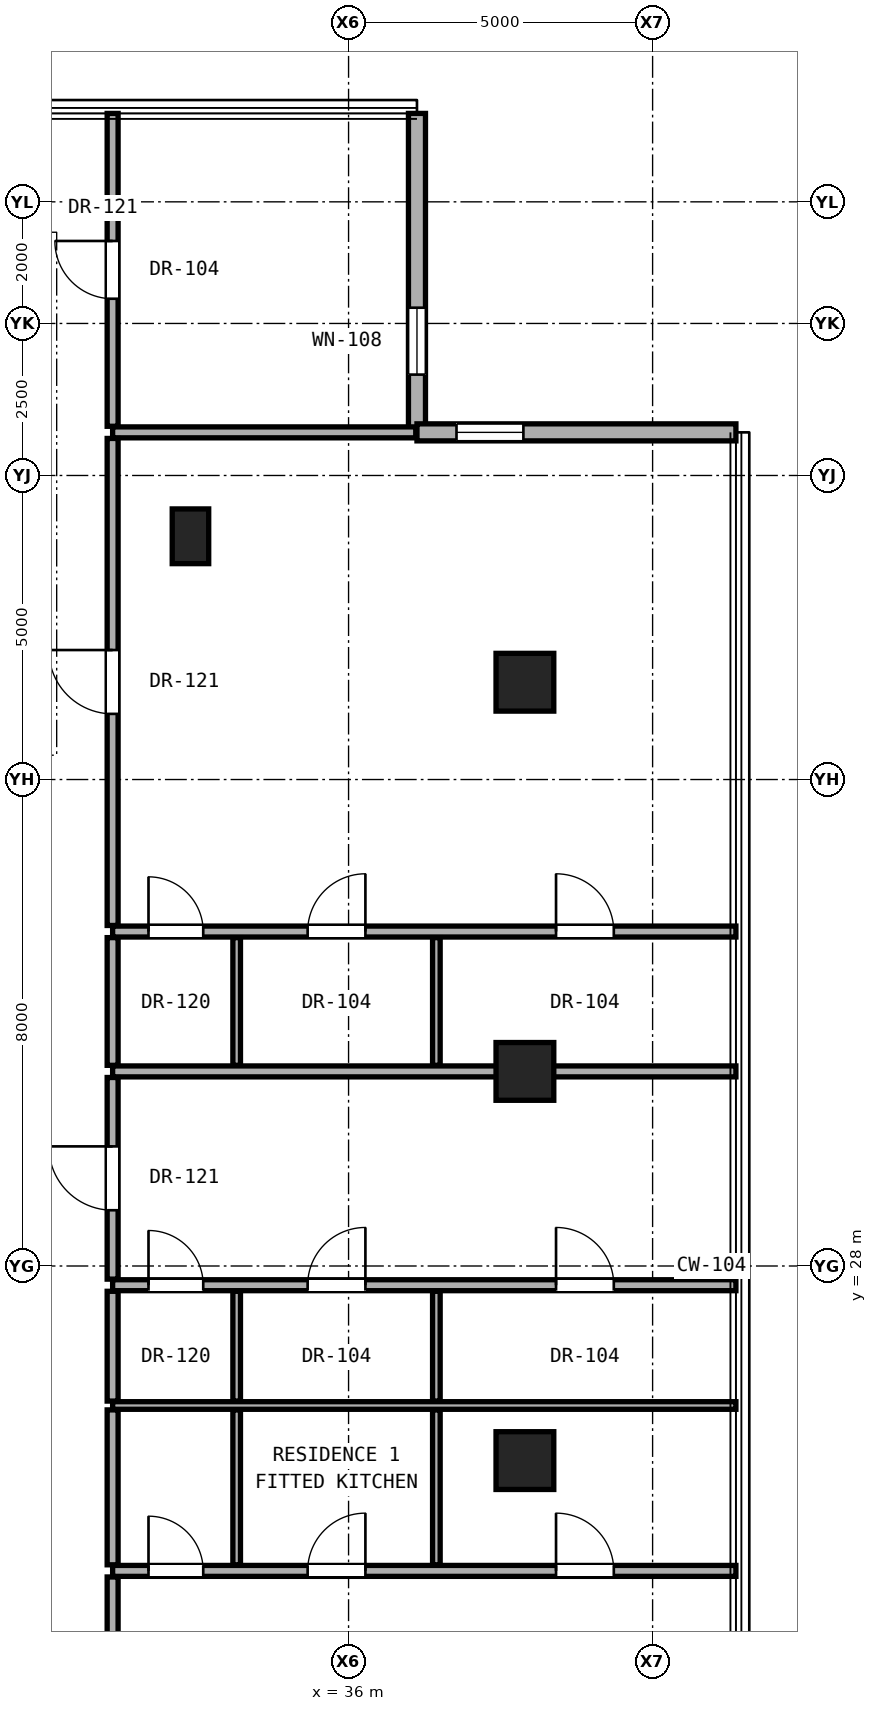
"""IFC4 building model, lengths in metres.
Left out: names, types, materials, properties, quantities, classifications, styles, units other than length and angle.
Written with IfcOpenShell. Run it as: python <this file> out.ifc"""

import sys

from ifc_helpers import new_model, si_unit, direction, frame, frame_2d, origin, origin_2d, place, context, subcontext, project, spatial, rectangle, hollow_rectangle, extrude, element, fill, save


model = new_model("IFC4")
c1 = context("Model", 3, precision=1e-05, world=origin(), true_north=direction((0.0, 1.0)))
c2 = subcontext(c1, "Body", "Model", "MODEL_VIEW")
j1 = project(units=[si_unit("LENGTHUNIT", "METRE"), si_unit("PLANEANGLEUNIT", "RADIAN")], contexts=[c1])
p1 = place(None, origin())
s1 = spatial("IfcSite", under=j1, at=p1, CompositionType="ELEMENT")
p2 = place(p1, origin())
s2 = spatial("IfcBuilding", under=s1, at=p2, CompositionType="ELEMENT")
p3 = place(p2, frame((0.0, 0.0, 180.4)))
s3 = spatial("IfcBuildingStorey", under=s2, at=p3, CompositionType="ELEMENT", Elevation=180.4)
for number, where, z_axis, x_axis in (
    (1, (38.9, 24.8, 0.0), (0.0, 0.0, 1.0), (1.0, 0.0, 0.0)),
    (2, (38.9, 31.2, 0.0), (0.0, 0.0, 1.0), (1.0, 0.0, 0.0)),
    (3, (38.9, 37.6, 0.0), (0.0, 0.0, 1.0), (1.0, 0.0, 0.0)),
):
    element("IfcColumn", number, at=place(p3, frame(where, z_axis=z_axis, x_axis=x_axis)), inside=s3, PredefinedType="COLUMN", context=c2, shape_type="SweptSolid", body=[
        extrude(hollow_rectangle(XDim=0.95, YDim=0.95, WallThickness=0.05, at=origin_2d()), origin(), (0.0, 0.0, 1.0), 3.25),
    ])
p4 = place(p3, frame((33.4, 40.0, 0.0), z_axis=(0.0, 0.0, 1.0), x_axis=(1.0, 0.0, 0.0)))
e4 = element("IfcColumn", 4, at=p4, inside=s3, PredefinedType="PILASTER", context=c2, shape_type="SweptSolid", body=[
    extrude(rectangle(XDim=0.6, YDim=0.9, at=origin_2d()), origin(), (0.0, 0.0, 1.0), 3.25),
])
p5 = place(p3, frame((37.125, 41.709, 0.0), z_axis=(0.0, 0.0, 1.0), x_axis=(0.0, 1.0, 0.0)))
e5 = element("IfcWall", 5, at=p5, inside=s3, PredefinedType="SOLIDWALL", context=c2, shape_type="SweptSolid", body=[
    extrude(rectangle(XDim=5.245, YDim=0.28, at=frame_2d((2.623, 0.0))), origin(), (0.0, 0.0, 1.0), 3.03),
])
p6 = place(p5, frame((0.95, 0.0, 0.85)))
e6 = element("IfcOpeningElement", 6, at=p6, cuts=e5, PredefinedType="OPENING", context=c2, shape_type="SweptSolid", body=[
    extrude(rectangle(XDim=1.1, YDim=2.0, at=frame_2d((0.55, 1.0))), frame((0.0, 0.15, 0.0), z_axis=(0.0, -1.0, 0.0), x_axis=(1.0, 0.0, 0.0)), (0.0, 0.0, 1.0), 0.3),
])
p7 = place(p3, frame((42.37, 41.709, 0.0), z_axis=(0.0, 0.0, 1.0), x_axis=(-1.0, 0.0, 0.0)))
e7 = element("IfcWall", 7, at=p7, inside=s3, PredefinedType="SOLIDWALL", context=c2, shape_type="SweptSolid", body=[
    extrude(rectangle(XDim=5.245, YDim=0.28, at=frame_2d((2.623, 0.0))), origin(), (0.0, 0.0, 1.0), 3.03),
])
p8 = place(p7, frame((3.495, 0.0, 0.85)))
e8 = element("IfcOpeningElement", 8, at=p8, cuts=e7, PredefinedType="OPENING", context=c2, shape_type="SweptSolid", body=[
    extrude(rectangle(XDim=1.1, YDim=2.0, at=frame_2d((0.55, 1.0))), frame((0.0, 0.15, 0.0), z_axis=(0.0, -1.0, 0.0), x_axis=(1.0, 0.0, 0.0)), (0.0, 0.0, 1.0), 0.3),
])
p9 = place(p3, frame((32.12, 22.986, 0.0), z_axis=(0.0, 0.0, 1.0), x_axis=(1.0, 0.0, 0.0)))
e9 = element("IfcWall", 9, at=p9, inside=s3, PredefinedType="PARTITIONING", context=c2, shape_type="SweptSolid", body=[
    extrude(rectangle(XDim=10.25, YDim=0.18, at=frame_2d((5.125, 0.0))), origin(), (0.0, 0.0, 1.0), 2.269),
])
p10 = place(p9, frame((7.292, 0.0, 0.0)))
e10 = element("IfcOpeningElement", 10, at=p10, cuts=e9, PredefinedType="OPENING", context=c2, shape_type="SweptSolid", body=[
    extrude(rectangle(XDim=0.95, YDim=2.15, at=frame_2d((0.475, 1.075))), frame((0.0, 0.1, 0.0), z_axis=(0.0, -1.0, 0.0), x_axis=(1.0, 0.0, 0.0)), (0.0, 0.0, 1.0), 0.2),
])
p11 = place(p9, frame((3.207, 0.0, 0.0)))
e11 = element("IfcOpeningElement", 11, at=p11, cuts=e9, PredefinedType="OPENING", context=c2, shape_type="SweptSolid", body=[
    extrude(rectangle(XDim=0.95, YDim=2.15, at=frame_2d((0.475, 1.075))), frame((0.0, 0.1, 0.0), z_axis=(0.0, -1.0, 0.0), x_axis=(1.0, 0.0, 0.0)), (0.0, 0.0, 1.0), 0.2),
])
p12 = place(p9, frame((0.59, 0.0, 0.0)))
e12 = element("IfcOpeningElement", 12, at=p12, cuts=e9, PredefinedType="OPENING", context=c2, shape_type="SweptSolid", body=[
    extrude(rectangle(XDim=0.9, YDim=2.1, at=frame_2d((0.45, 1.05))), frame((0.0, 0.1, 0.0), z_axis=(0.0, -1.0, 0.0), x_axis=(1.0, 0.0, 0.0)), (0.0, 0.0, 1.0), 0.2),
])
p13 = place(p3, frame((32.12, 25.706, 0.0), z_axis=(0.0, 0.0, 1.0), x_axis=(1.0, 0.0, 0.0)))
e13 = element("IfcWall", 13, at=p13, inside=s3, PredefinedType="PARTITIONING", context=c2, shape_type="SweptSolid", body=[
    extrude(rectangle(XDim=10.25, YDim=0.125, at=frame_2d((5.125, 0.0))), origin(), (0.0, 0.0, 1.0), 2.269),
])
p14 = place(p3, frame((32.12, 27.684, 0.0), z_axis=(0.0, 0.0, 1.0), x_axis=(1.0, 0.0, 0.0)))
e14 = element("IfcWall", 14, at=p14, inside=s3, PredefinedType="PARTITIONING", context=c2, shape_type="SweptSolid", body=[
    extrude(rectangle(XDim=10.25, YDim=0.18, at=frame_2d((5.125, 0.0))), origin(), (0.0, 0.0, 1.0), 2.269),
])
p15 = place(p14, frame((7.292, 0.0, 0.0)))
e15 = element("IfcOpeningElement", 15, at=p15, cuts=e14, PredefinedType="OPENING", context=c2, shape_type="SweptSolid", body=[
    extrude(rectangle(XDim=0.95, YDim=2.15, at=frame_2d((0.475, 1.075))), frame((0.0, 0.1, 0.0), z_axis=(0.0, -1.0, 0.0), x_axis=(1.0, 0.0, 0.0)), (0.0, 0.0, 1.0), 0.2),
])
p16 = place(p14, frame((3.207, 0.0, 0.0)))
e16 = element("IfcOpeningElement", 16, at=p16, cuts=e14, PredefinedType="OPENING", context=c2, shape_type="SweptSolid", body=[
    extrude(rectangle(XDim=0.95, YDim=2.15, at=frame_2d((0.475, 1.075))), frame((0.0, 0.1, 0.0), z_axis=(0.0, -1.0, 0.0), x_axis=(1.0, 0.0, 0.0)), (0.0, 0.0, 1.0), 0.2),
])
p17 = place(p14, frame((0.59, 0.0, 0.0)))
e17 = element("IfcOpeningElement", 17, at=p17, cuts=e14, PredefinedType="OPENING", context=c2, shape_type="SweptSolid", body=[
    extrude(rectangle(XDim=0.9, YDim=2.1, at=frame_2d((0.45, 1.05))), frame((0.0, 0.1, 0.0), z_axis=(0.0, -1.0, 0.0), x_axis=(1.0, 0.0, 0.0)), (0.0, 0.0, 1.0), 0.2),
])
p18 = place(p3, frame((32.12, 31.2, 0.0), z_axis=(0.0, 0.0, 1.0), x_axis=(1.0, 0.0, 0.0)))
e18 = element("IfcWall", 18, at=p18, inside=s3, PredefinedType="PARTITIONING", context=c2, shape_type="SweptSolid", body=[
    extrude(rectangle(XDim=10.25, YDim=0.18, at=frame_2d((5.125, 0.0))), origin(), (0.0, 0.0, 1.0), 2.269),
])
p19 = place(p3, frame((32.12, 33.5, 0.0), z_axis=(0.0, 0.0, 1.0), x_axis=(1.0, 0.0, 0.0)))
e19 = element("IfcWall", 19, at=p19, inside=s3, PredefinedType="PARTITIONING", context=c2, shape_type="SweptSolid", body=[
    extrude(rectangle(XDim=10.25, YDim=0.18, at=frame_2d((5.125, 0.0))), origin(), (0.0, 0.0, 1.0), 2.269),
])
p20 = place(p19, frame((7.292, 0.0, 0.0)))
e20 = element("IfcOpeningElement", 20, at=p20, cuts=e19, PredefinedType="OPENING", context=c2, shape_type="SweptSolid", body=[
    extrude(rectangle(XDim=0.95, YDim=2.15, at=frame_2d((0.475, 1.075))), frame((0.0, 0.1, 0.0), z_axis=(0.0, -1.0, 0.0), x_axis=(1.0, 0.0, 0.0)), (0.0, 0.0, 1.0), 0.2),
])
p21 = place(p19, frame((3.207, 0.0, 0.0)))
e21 = element("IfcOpeningElement", 21, at=p21, cuts=e19, PredefinedType="OPENING", context=c2, shape_type="SweptSolid", body=[
    extrude(rectangle(XDim=0.95, YDim=2.15, at=frame_2d((0.475, 1.075))), frame((0.0, 0.1, 0.0), z_axis=(0.0, -1.0, 0.0), x_axis=(1.0, 0.0, 0.0)), (0.0, 0.0, 1.0), 0.2),
])
p22 = place(p19, frame((0.59, 0.0, 0.0)))
e22 = element("IfcOpeningElement", 22, at=p22, cuts=e19, PredefinedType="OPENING", context=c2, shape_type="SweptSolid", body=[
    extrude(rectangle(XDim=0.9, YDim=2.1, at=frame_2d((0.45, 1.05))), frame((0.0, 0.1, 0.0), z_axis=(0.0, -1.0, 0.0), x_axis=(1.0, 0.0, 0.0)), (0.0, 0.0, 1.0), 0.2),
])
p23 = place(p3, frame((32.12, 41.709, 0.0), z_axis=(0.0, 0.0, 1.0), x_axis=(1.0, 0.0, 0.0)))
e23 = element("IfcWall", 23, at=p23, inside=s3, PredefinedType="PARTITIONING", context=c2, shape_type="SweptSolid", body=[
    extrude(rectangle(XDim=4.985, YDim=0.18, at=frame_2d((2.492, 0.0))), origin(), (0.0, 0.0, 1.0), 3.05),
])
p24 = place(p3, frame((32.12, 14.391, 0.0), z_axis=(0.0, 0.0, 1.0), x_axis=(0.0, 1.0, 0.0)))
e24 = element("IfcWall", 24, at=p24, inside=s3, PredefinedType="PARTITIONING", context=c2, shape_type="SweptSolid", body=[
    extrude(rectangle(XDim=8.495, YDim=0.18, at=frame_2d((4.248, 0.0))), origin(), (0.0, 0.0, 1.0), 2.442),
])
p25 = place(p24, frame((3.722, 0.0, 0.0)))
e25 = element("IfcOpeningElement", 25, at=p25, cuts=e24, PredefinedType="OPENING", context=c2, shape_type="SweptSolid", body=[
    extrude(rectangle(XDim=1.05, YDim=2.2, at=frame_2d((0.525, 1.1))), frame((0.0, 0.1, 0.0), z_axis=(0.0, -1.0, 0.0), x_axis=(1.0, 0.0, 0.0)), (0.0, 0.0, 1.0), 0.2),
])
p26 = place(p3, frame((32.12, 23.086, 0.0), z_axis=(0.0, 0.0, 1.0), x_axis=(0.0, 1.0, 0.0)))
e26 = element("IfcWall", 26, at=p26, inside=s3, PredefinedType="PARTITIONING", context=c2, shape_type="SweptSolid", body=[
    extrude(rectangle(XDim=2.548, YDim=0.18, at=frame_2d((1.274, 0.0))), origin(), (0.0, 0.0, 1.0), 2.346),
])
p27 = place(p3, frame((32.12, 25.779, 0.0), z_axis=(0.0, 0.0, 1.0), x_axis=(0.0, 1.0, 0.0)))
e27 = element("IfcWall", 27, at=p27, inside=s3, PredefinedType="PARTITIONING", context=c2, shape_type="SweptSolid", body=[
    extrude(rectangle(XDim=1.805, YDim=0.18, at=frame_2d((0.903, 0.0))), origin(), (0.0, 0.0, 1.0), 3.05),
])
p28 = place(p3, frame((32.12, 27.784, 0.0), z_axis=(0.0, 0.0, 1.0), x_axis=(0.0, 1.0, 0.0)))
e28 = element("IfcWall", 28, at=p28, inside=s3, PredefinedType="PARTITIONING", context=c2, shape_type="SweptSolid", body=[
    extrude(rectangle(XDim=3.316, YDim=0.18, at=frame_2d((1.658, 0.0))), origin(), (0.0, 0.0, 1.0), 2.346),
])
p29 = place(p28, frame((1.133, 0.0, 0.0)))
e29 = element("IfcOpeningElement", 29, at=p29, cuts=e28, PredefinedType="OPENING", context=c2, shape_type="SweptSolid", body=[
    extrude(rectangle(XDim=1.05, YDim=2.2, at=frame_2d((0.525, 1.1))), frame((0.0, 0.1, 0.0), z_axis=(0.0, -1.0, 0.0), x_axis=(1.0, 0.0, 0.0)), (0.0, 0.0, 1.0), 0.2),
])
p30 = place(p3, frame((32.12, 31.3, 0.0), z_axis=(0.0, 0.0, 1.0), x_axis=(0.0, 1.0, 0.0)))
e30 = element("IfcWall", 30, at=p30, inside=s3, PredefinedType="PARTITIONING", context=c2, shape_type="SweptSolid", body=[
    extrude(rectangle(XDim=2.1, YDim=0.18, at=frame_2d((1.05, 0.0))), origin(), (0.0, 0.0, 1.0), 2.346),
])
p31 = place(p3, frame((32.12, 33.6, 0.0), z_axis=(0.0, 0.0, 1.0), x_axis=(0.0, 1.0, 0.0)))
e31 = element("IfcWall", 31, at=p31, inside=s3, PredefinedType="PARTITIONING", context=c2, shape_type="SweptSolid", body=[
    extrude(rectangle(XDim=8.009, YDim=0.18, at=frame_2d((4.004, 0.0))), origin(), (0.0, 0.0, 1.0), 2.442),
])
p32 = place(p31, frame((3.479, 0.0, 0.0)))
e32 = element("IfcOpeningElement", 32, at=p32, cuts=e31, PredefinedType="OPENING", context=c2, shape_type="SweptSolid", body=[
    extrude(rectangle(XDim=1.05, YDim=2.2, at=frame_2d((0.525, 1.1))), frame((0.0, 0.1, 0.0), z_axis=(0.0, -1.0, 0.0), x_axis=(1.0, 0.0, 0.0)), (0.0, 0.0, 1.0), 0.2),
])
p33 = place(p3, frame((32.12, 41.809, 0.0), z_axis=(0.0, 0.0, 1.0), x_axis=(0.0, 1.0, 0.0)))
e33 = element("IfcWall", 33, at=p33, inside=s3, PredefinedType="PARTITIONING", context=c2, shape_type="SweptSolid", body=[
    extrude(rectangle(XDim=5.145, YDim=0.18, at=frame_2d((2.573, 0.0))), origin(), (0.0, 0.0, 1.0), 3.05),
])
p34 = place(p33, frame((2.097, 0.0, 0.0)))
e34 = element("IfcOpeningElement", 34, at=p34, cuts=e33, PredefinedType="OPENING", context=c2, shape_type="SweptSolid", body=[
    extrude(rectangle(XDim=0.95, YDim=2.15, at=frame_2d((0.475, 1.075))), frame((0.0, 0.1, 0.0), z_axis=(0.0, -1.0, 0.0), x_axis=(1.0, 0.0, 0.0)), (0.0, 0.0, 1.0), 0.2),
])
p35 = place(p3, frame((34.16, 23.086, 0.0), z_axis=(0.0, 0.0, 1.0), x_axis=(0.0, 1.0, 0.0)))
e35 = element("IfcWall", 35, at=p35, inside=s3, PredefinedType="PARTITIONING", context=c2, shape_type="SweptSolid", body=[
    extrude(rectangle(XDim=2.548, YDim=0.125, at=frame_2d((1.274, 0.0))), origin(), (0.0, 0.0, 1.0), 2.346),
])
p36 = place(p3, frame((34.16, 25.779, 0.0), z_axis=(0.0, 0.0, 1.0), x_axis=(0.0, 1.0, 0.0)))
e36 = element("IfcWall", 36, at=p36, inside=s3, PredefinedType="PARTITIONING", context=c2, shape_type="SweptSolid", body=[
    extrude(rectangle(XDim=1.805, YDim=0.125, at=frame_2d((0.903, 0.0))), origin(), (0.0, 0.0, 1.0), 3.05),
])
p37 = place(p3, frame((34.16, 31.3, 0.0), z_axis=(0.0, 0.0, 1.0), x_axis=(0.0, 1.0, 0.0)))
e37 = element("IfcWall", 37, at=p37, inside=s3, PredefinedType="PARTITIONING", context=c2, shape_type="SweptSolid", body=[
    extrude(rectangle(XDim=2.1, YDim=0.125, at=frame_2d((1.05, 0.0))), origin(), (0.0, 0.0, 1.0), 2.346),
])
p38 = place(p3, frame((37.444, 23.086, 0.0), z_axis=(0.0, 0.0, 1.0), x_axis=(0.0, 1.0, 0.0)))
e38 = element("IfcWall", 38, at=p38, inside=s3, PredefinedType="PARTITIONING", context=c2, shape_type="SweptSolid", body=[
    extrude(rectangle(XDim=2.548, YDim=0.125, at=frame_2d((1.274, 0.0))), origin(), (0.0, 0.0, 1.0), 2.346),
])
p39 = place(p3, frame((37.444, 25.779, 0.0), z_axis=(0.0, 0.0, 1.0), x_axis=(0.0, 1.0, 0.0)))
e39 = element("IfcWall", 39, at=p39, inside=s3, PredefinedType="PARTITIONING", context=c2, shape_type="SweptSolid", body=[
    extrude(rectangle(XDim=1.805, YDim=0.125, at=frame_2d((0.903, 0.0))), origin(), (0.0, 0.0, 1.0), 3.05),
])
p40 = place(p3, frame((37.444, 31.3, 0.0), z_axis=(0.0, 0.0, 1.0), x_axis=(0.0, 1.0, 0.0)))
e40 = element("IfcWall", 40, at=p40, inside=s3, PredefinedType="PARTITIONING", context=c2, shape_type="SweptSolid", body=[
    extrude(rectangle(XDim=2.1, YDim=0.125, at=frame_2d((1.05, 0.0))), origin(), (0.0, 0.0, 1.0), 2.346),
])
p41 = place(p6, origin())
e41 = element("IfcWindow", 41, at=p41, inside=s3, PartitioningType="SINGLE_PANEL", PredefinedType="WINDOW", context=c2, shape_type="SweptSolid", body=[
    extrude(rectangle(XDim=1.1, YDim=2.0, at=frame_2d((0.55, 1.0))), frame((0.0, 0.03, 0.0), z_axis=(0.0, -1.0, 0.0), x_axis=(1.0, 0.0, 0.0)), (0.0, 0.0, 1.0), 0.06),
])
fill(e6, e41)
p42 = place(p8, origin())
e42 = element("IfcWindow", 42, at=p42, inside=s3, PartitioningType="SINGLE_PANEL", PredefinedType="WINDOW", context=c2, shape_type="SweptSolid", body=[
    extrude(rectangle(XDim=1.1, YDim=2.0, at=frame_2d((0.55, 1.0))), frame((0.0, 0.03, 0.0), z_axis=(0.0, -1.0, 0.0), x_axis=(1.0, 0.0, 0.0)), (0.0, 0.0, 1.0), 0.06),
])
fill(e8, e42)
p43 = place(p10, origin())
e43 = element("IfcDoor", 43, at=p43, inside=s3, OperationType="SINGLE_SWING_LEFT", PredefinedType="DOOR", context=c2, shape_type="SweptSolid", body=[
    extrude(rectangle(XDim=0.95, YDim=2.15, at=frame_2d((0.475, 1.075))), frame((0.0, 0.025, 0.0), z_axis=(0.0, -1.0, 0.0), x_axis=(1.0, 0.0, 0.0)), (0.0, 0.0, 1.0), 0.05),
])
fill(e10, e43)
p44 = place(p11, origin())
e44 = element("IfcDoor", 44, at=p44, inside=s3, OperationType="SINGLE_SWING_RIGHT", PredefinedType="DOOR", context=c2, shape_type="SweptSolid", body=[
    extrude(rectangle(XDim=0.95, YDim=2.15, at=frame_2d((0.475, 1.075))), frame((0.0, 0.025, 0.0), z_axis=(0.0, -1.0, 0.0), x_axis=(1.0, 0.0, 0.0)), (0.0, 0.0, 1.0), 0.05),
])
fill(e11, e44)
p45 = place(p12, origin())
e45 = element("IfcDoor", 45, at=p45, inside=s3, OperationType="SINGLE_SWING_LEFT", PredefinedType="DOOR", context=c2, shape_type="SweptSolid", body=[
    extrude(rectangle(XDim=0.9, YDim=2.1, at=frame_2d((0.45, 1.05))), frame((0.0, 0.025, 0.0), z_axis=(0.0, -1.0, 0.0), x_axis=(1.0, 0.0, 0.0)), (0.0, 0.0, 1.0), 0.05),
])
fill(e12, e45)
p46 = place(p29, origin())
e46 = element("IfcDoor", 46, at=p46, inside=s3, OperationType="SINGLE_SWING_RIGHT", PredefinedType="DOOR", context=c2, shape_type="SweptSolid", body=[
    extrude(rectangle(XDim=1.05, YDim=2.2, at=frame_2d((0.525, 1.1))), frame((0.0, 0.025, 0.0), z_axis=(0.0, -1.0, 0.0), x_axis=(1.0, 0.0, 0.0)), (0.0, 0.0, 1.0), 0.05),
])
fill(e29, e46)
p47 = place(p15, origin())
e47 = element("IfcDoor", 47, at=p47, inside=s3, OperationType="SINGLE_SWING_LEFT", PredefinedType="DOOR", context=c2, shape_type="SweptSolid", body=[
    extrude(rectangle(XDim=0.95, YDim=2.15, at=frame_2d((0.475, 1.075))), frame((0.0, 0.025, 0.0), z_axis=(0.0, -1.0, 0.0), x_axis=(1.0, 0.0, 0.0)), (0.0, 0.0, 1.0), 0.05),
])
fill(e15, e47)
p48 = place(p16, origin())
e48 = element("IfcDoor", 48, at=p48, inside=s3, OperationType="SINGLE_SWING_RIGHT", PredefinedType="DOOR", context=c2, shape_type="SweptSolid", body=[
    extrude(rectangle(XDim=0.95, YDim=2.15, at=frame_2d((0.475, 1.075))), frame((0.0, 0.025, 0.0), z_axis=(0.0, -1.0, 0.0), x_axis=(1.0, 0.0, 0.0)), (0.0, 0.0, 1.0), 0.05),
])
fill(e16, e48)
p49 = place(p17, origin())
e49 = element("IfcDoor", 49, at=p49, inside=s3, OperationType="SINGLE_SWING_LEFT", PredefinedType="DOOR", context=c2, shape_type="SweptSolid", body=[
    extrude(rectangle(XDim=0.9, YDim=2.1, at=frame_2d((0.45, 1.05))), frame((0.0, 0.025, 0.0), z_axis=(0.0, -1.0, 0.0), x_axis=(1.0, 0.0, 0.0)), (0.0, 0.0, 1.0), 0.05),
])
fill(e17, e49)
p50 = place(p32, origin())
e50 = element("IfcDoor", 50, at=p50, inside=s3, OperationType="SINGLE_SWING_RIGHT", PredefinedType="DOOR", context=c2, shape_type="SweptSolid", body=[
    extrude(rectangle(XDim=1.05, YDim=2.2, at=frame_2d((0.525, 1.1))), frame((0.0, 0.025, 0.0), z_axis=(0.0, -1.0, 0.0), x_axis=(1.0, 0.0, 0.0)), (0.0, 0.0, 1.0), 0.05),
])
fill(e32, e50)
p51 = place(p20, origin())
e51 = element("IfcDoor", 51, at=p51, inside=s3, OperationType="SINGLE_SWING_LEFT", PredefinedType="DOOR", context=c2, shape_type="SweptSolid", body=[
    extrude(rectangle(XDim=0.95, YDim=2.15, at=frame_2d((0.475, 1.075))), frame((0.0, 0.025, 0.0), z_axis=(0.0, -1.0, 0.0), x_axis=(1.0, 0.0, 0.0)), (0.0, 0.0, 1.0), 0.05),
])
fill(e20, e51)
p52 = place(p21, origin())
e52 = element("IfcDoor", 52, at=p52, inside=s3, OperationType="SINGLE_SWING_RIGHT", PredefinedType="DOOR", context=c2, shape_type="SweptSolid", body=[
    extrude(rectangle(XDim=0.95, YDim=2.15, at=frame_2d((0.475, 1.075))), frame((0.0, 0.025, 0.0), z_axis=(0.0, -1.0, 0.0), x_axis=(1.0, 0.0, 0.0)), (0.0, 0.0, 1.0), 0.05),
])
fill(e21, e52)
p53 = place(p22, origin())
e53 = element("IfcDoor", 53, at=p53, inside=s3, OperationType="SINGLE_SWING_LEFT", PredefinedType="DOOR", context=c2, shape_type="SweptSolid", body=[
    extrude(rectangle(XDim=0.9, YDim=2.1, at=frame_2d((0.45, 1.05))), frame((0.0, 0.025, 0.0), z_axis=(0.0, -1.0, 0.0), x_axis=(1.0, 0.0, 0.0)), (0.0, 0.0, 1.0), 0.05),
])
fill(e22, e53)
p54 = place(p34, origin())
e54 = element("IfcDoor", 54, at=p54, inside=s3, OperationType="SINGLE_SWING_RIGHT", PredefinedType="DOOR", context=c2, shape_type="SweptSolid", body=[
    extrude(rectangle(XDim=0.95, YDim=2.15, at=frame_2d((0.475, 1.075))), frame((0.0, 0.025, 0.0), z_axis=(0.0, -1.0, 0.0), x_axis=(1.0, 0.0, 0.0)), (0.0, 0.0, 1.0), 0.05),
])
fill(e34, e54)
save(model, sys.argv[1])
